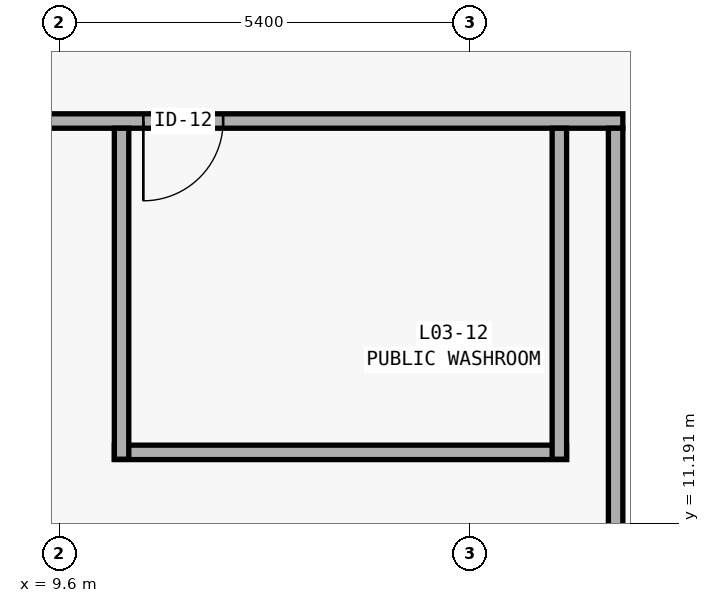
"""IFC4 building model, lengths in metres.
Left out: names, types, materials, properties, quantities, classifications, styles, units other than length and angle.
Written with IfcOpenShell. Run it as: python <this file> out.ifc"""

import sys

from ifc_helpers import new_model, si_unit, direction, frame, frame_2d, origin, place, context, subcontext, project, spatial, rectangle, extrude, element, fill, save


model = new_model("IFC4")
c1 = context("Model", 3, precision=1e-05, world=origin(), true_north=direction((0.0, 1.0)))
c2 = subcontext(c1, "Body", "Model", "MODEL_VIEW")
j1 = project(units=[si_unit("LENGTHUNIT", "METRE"), si_unit("PLANEANGLEUNIT", "RADIAN")], contexts=[c1])
p1 = place(None, origin())
s1 = spatial("IfcSite", under=j1, at=p1, CompositionType="ELEMENT")
p2 = place(p1, origin())
s2 = spatial("IfcBuilding", under=s1, at=p2, CompositionType="ELEMENT")
p3 = place(p2, frame((0.0, 0.0, 17.1)))
s3 = spatial("IfcBuildingStorey", under=s2, at=p3, CompositionType="ELEMENT", Elevation=17.1)
p4 = place(p3, frame((10.325, 12.12, 0.0), z_axis=(0.0, 0.0, 1.0), x_axis=(1.0, 0.0, 0.0)))
e1 = element("IfcWall", 1, at=p4, inside=s3, PredefinedType="PARTITIONING", context=c2, shape_type="SweptSolid", body=[
    extrude(rectangle(XDim=5.95, YDim=0.19, at=frame_2d((2.975, 0.0))), origin(), (0.0, 0.0, 1.0), 2.82),
])
p5 = place(p3, frame((1.795, 16.48, 0.0), z_axis=(0.0, 0.0, 1.0), x_axis=(1.0, 0.0, 0.0)))
e2 = element("IfcWall", 2, at=p5, inside=s3, PredefinedType="PARTITIONING", context=c2, shape_type="SweptSolid", body=[
    extrude(rectangle(XDim=15.22, YDim=0.19, at=frame_2d((7.61, 0.0))), origin(), (0.0, 0.0, 1.0), 2.82),
])
p6 = place(p5, frame((8.911, 0.0, 0.0)))
e3 = element("IfcOpeningElement", 3, at=p6, cuts=e2, PredefinedType="OPENING", context=c2, shape_type="SweptSolid", body=[
    extrude(rectangle(XDim=1.05, YDim=2.1, at=frame_2d((0.525, 1.05))), frame((0.0, 0.11, 0.0), z_axis=(0.0, -1.0, 0.0), x_axis=(1.0, 0.0, 0.0)), (0.0, 0.0, 1.0), 0.22),
])
p7 = place(p5, frame((5.772, 0.0, 0.0)))
e4 = element("IfcOpeningElement", 4, at=p7, cuts=e2, PredefinedType="OPENING", context=c2, shape_type="SweptSolid", body=[
    extrude(rectangle(XDim=1.85, YDim=2.35, at=frame_2d((0.925, 1.175))), frame((0.0, 0.11, 0.0), z_axis=(0.0, -1.0, 0.0), x_axis=(1.0, 0.0, 0.0)), (0.0, 0.0, 1.0), 0.22),
])
for number, where, z_axis, x_axis in (
    (5, (10.42, 12.03, 0.0), (0.0, 0.0, 1.0), (0.0, 1.0, 0.0)),
    (6, (16.18, 12.03, 0.0), (0.0, 0.0, 1.0), (0.0, 1.0, 0.0)),
):
    element("IfcWall", number, at=place(p3, frame(where, z_axis=z_axis, x_axis=x_axis)), inside=s3, PredefinedType="PARTITIONING", context=c2, shape_type="SweptSolid", body=[
        extrude(rectangle(XDim=4.355, YDim=0.19, at=frame_2d((2.177, 0.0))), origin(), (0.0, 0.0, 1.0), 2.82),
    ])
p8 = place(p3, frame((16.92, 3.115, 0.0), z_axis=(0.0, 0.0, 1.0), x_axis=(0.0, 1.0, 0.0)))
e7 = element("IfcWall", 7, at=p8, inside=s3, PredefinedType="PARTITIONING", context=c2, shape_type="SweptSolid", body=[
    extrude(rectangle(XDim=13.27, YDim=0.19, at=frame_2d((6.635, 0.0))), origin(), (0.0, 0.0, 1.0), 2.82),
])
p9 = place(p6, frame((1.05, 0.0, 0.0), z_axis=(0.0, 0.0, 1.0), x_axis=(-1.0, 0.0, 0.0)))
e8 = element("IfcDoor", 8, at=p9, inside=s3, OperationType="SINGLE_SWING_LEFT", PredefinedType="DOOR", context=c2, shape_type="SweptSolid", body=[
    extrude(rectangle(XDim=1.05, YDim=2.1, at=frame_2d((0.525, 1.05))), frame((0.0, 0.025, 0.0), z_axis=(0.0, -1.0, 0.0), x_axis=(1.0, 0.0, 0.0)), (0.0, 0.0, 1.0), 0.05),
])
fill(e3, e8)
save(model, sys.argv[1])
